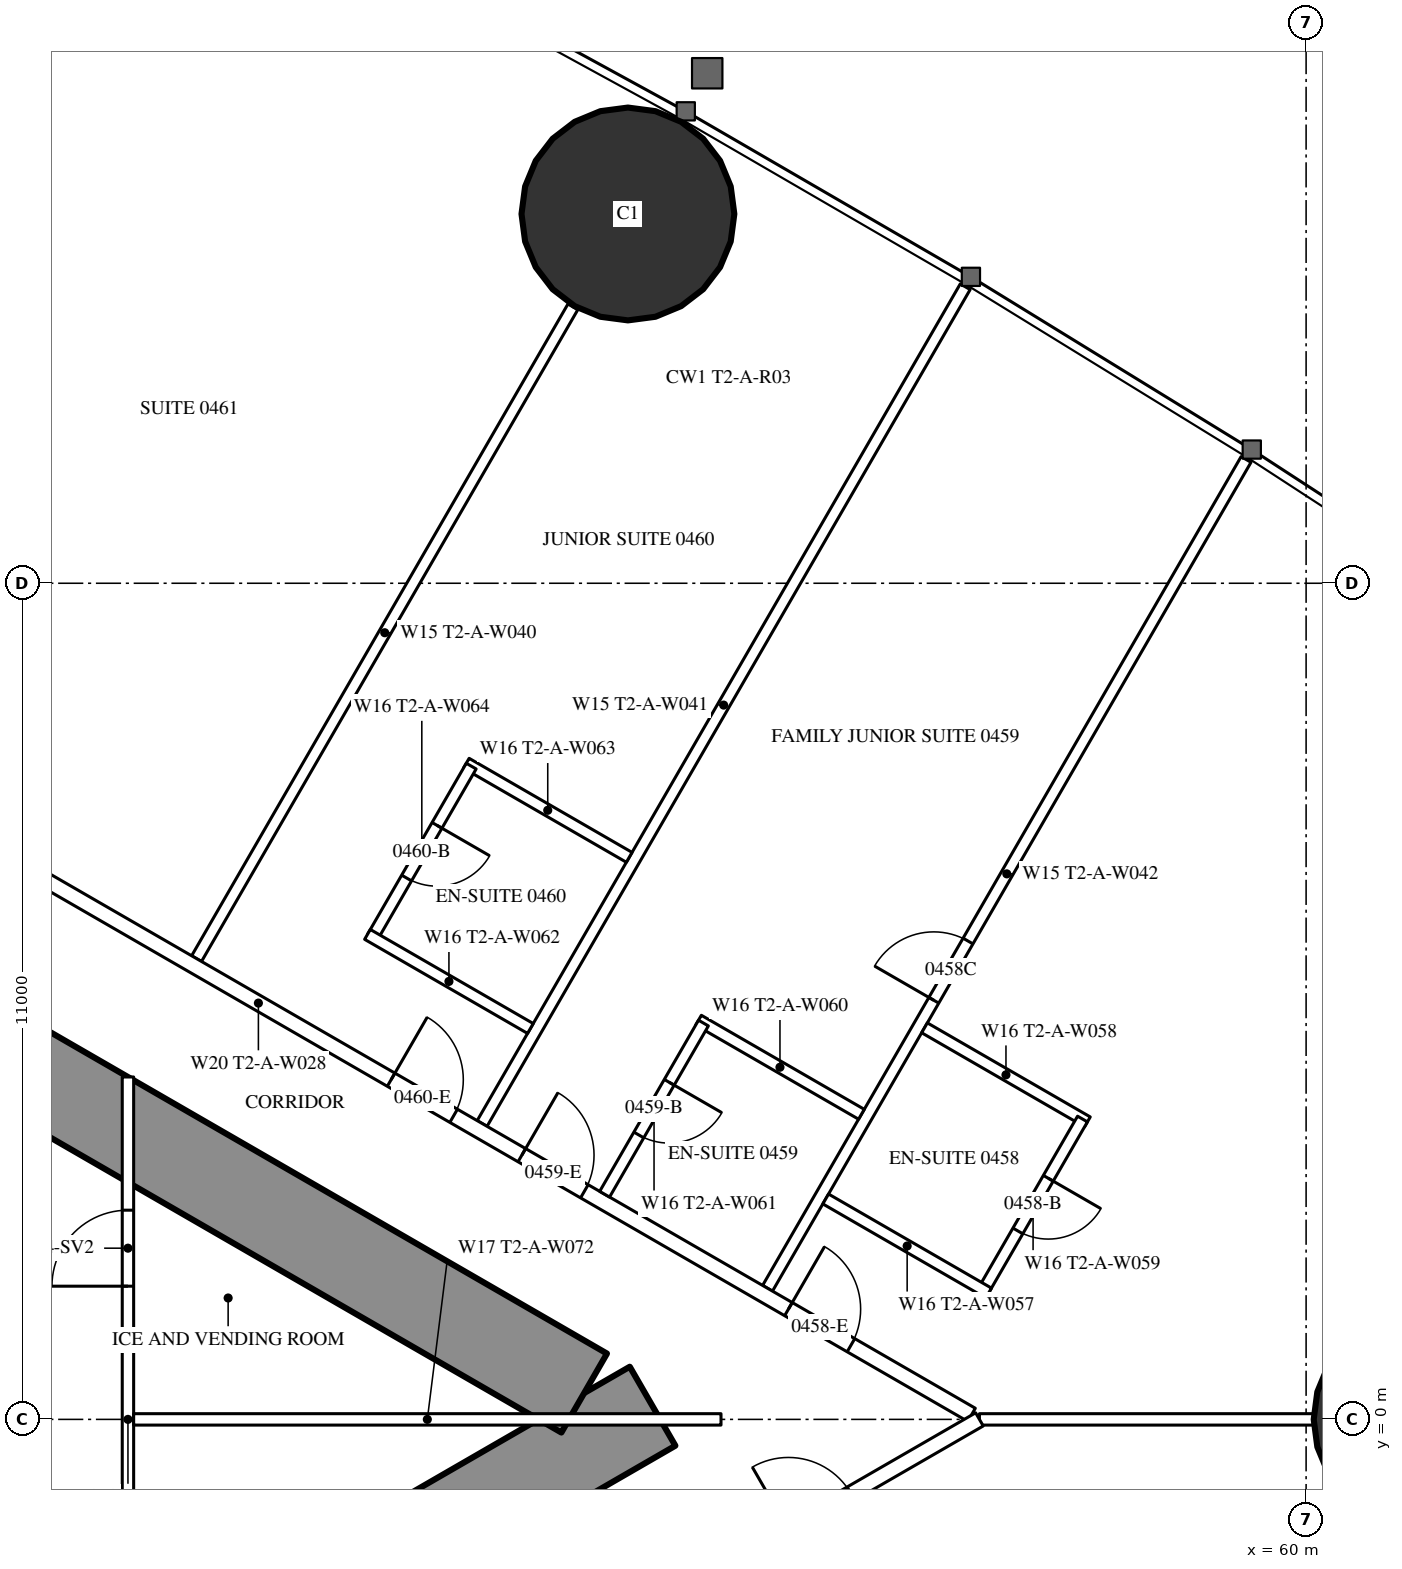
"""IFC4 building model, lengths in metres.
Left out: names, types, materials, properties, quantities, classifications, styles, units other than length and angle.
Written with IfcOpenShell. Run it as: python <this file> out.ifc"""

import sys

from ifc_helpers import new_model, si_unit, direction, frame, frame_2d, origin, origin_2d, place, context, subcontext, project, spatial, rectangle, hollow_circle, extrude, element, fill, save


model = new_model("IFC4")
c1 = context("Model", 3, precision=1e-05, world=origin(), true_north=direction((0.0, 1.0)))
c2 = subcontext(c1, "Body", "Model", "MODEL_VIEW")
j1 = project(units=[si_unit("LENGTHUNIT", "METRE"), si_unit("PLANEANGLEUNIT", "RADIAN")], contexts=[c1])
p1 = place(None, origin())
s1 = spatial("IfcSite", under=j1, at=p1, CompositionType="ELEMENT")
p2 = place(p1, origin())
s2 = spatial("IfcBuilding", under=s1, at=p2, CompositionType="ELEMENT")
p3 = place(p2, frame((0.0, 0.0, 21.5)))
s3 = spatial("IfcBuildingStorey", under=s2, at=p3, CompositionType="ELEMENT", Elevation=21.5)
p4 = place(p3, frame((51.078, 15.858, 0.0), z_axis=(0.0, 0.0, 1.0), x_axis=(1.0, 0.0, 0.0)))
e1 = element("IfcColumn", 1, at=p4, inside=s3, PredefinedType="COLUMN", context=c2, shape_type="SweptSolid", body=[
    extrude(hollow_circle(Radius=1.4, WallThickness=0.12, at=origin_2d()), origin(), (0.0, 0.0, 1.0), 3.5),
])
p5 = place(p3, frame((61.5, 0.0, 0.0), z_axis=(0.0, 0.0, 1.0), x_axis=(1.0, 0.0, 0.0)))
e2 = element("IfcColumn", 2, at=p5, inside=s3, PredefinedType="COLUMN", context=c2, shape_type="SweptSolid", body=[
    extrude(hollow_circle(Radius=1.4, WallThickness=0.1, at=origin_2d()), origin(), (0.0, 0.0, 1.0), 3.5),
])
p6 = place(p3, frame((27.2, -13.8, 0.0), z_axis=(0.0, 0.0, 1.0), x_axis=(0.866027159892, 0.499996958321, 0.0)))
e3 = element("IfcWall", 3, at=p6, inside=s3, PredefinedType="SHEAR", context=c2, shape_type="SweptSolid", body=[
    extrude(rectangle(XDim=27.947, YDim=1.2, at=frame_2d((13.973, 0.0))), origin(), (0.0, 0.0, 1.0), 3.5),
])
p7 = place(p6, frame((4.6, 0.0, 0.0)))
e4 = element("IfcOpeningElement", 4, at=p7, cuts=e3, PredefinedType="OPENING", context=c2, shape_type="SweptSolid", body=[
    extrude(rectangle(XDim=1.0, YDim=2.2, at=frame_2d((0.5, 1.1))), frame((0.0, 0.61, 0.0), z_axis=(0.0, -1.0, 0.0), x_axis=(1.0, 0.0, 0.0)), (0.0, 0.0, 1.0), 1.22),
])
p8 = place(p6, frame((13.395, 0.0, 0.0)))
e5 = element("IfcOpeningElement", 5, at=p8, cuts=e3, PredefinedType="OPENING", context=c2, shape_type="SweptSolid", body=[
    extrude(rectangle(XDim=1.8, YDim=2.2, at=frame_2d((0.9, 1.1))), frame((0.0, 0.61, 0.0), z_axis=(0.0, -1.0, 0.0), x_axis=(1.0, 0.0, 0.0)), (0.0, 0.0, 1.0), 1.22),
])
p9 = place(p3, frame((27.2, 13.8, 0.0), z_axis=(0.0, 0.0, 1.0), x_axis=(0.866024515034, -0.500001539357, 0.0)))
e6 = element("IfcWall", 6, at=p9, inside=s3, PredefinedType="SHEAR", context=c2, shape_type="SweptSolid", body=[
    extrude(rectangle(XDim=26.907, YDim=1.2, at=frame_2d((13.454, 0.0))), origin(), (0.0, 0.0, 1.0), 3.5),
])
p10 = place(p9, frame((4.6, 0.0, 0.0)))
e7 = element("IfcOpeningElement", 7, at=p10, cuts=e6, PredefinedType="OPENING", context=c2, shape_type="SweptSolid", body=[
    extrude(rectangle(XDim=1.0, YDim=2.2, at=frame_2d((0.5, 1.1))), frame((0.0, 0.61, 0.0), z_axis=(0.0, -1.0, 0.0), x_axis=(1.0, 0.0, 0.0)), (0.0, 0.0, 1.0), 1.22),
])
p11 = place(p9, frame((13.395, 0.0, 0.0)))
e8 = element("IfcOpeningElement", 8, at=p11, cuts=e6, PredefinedType="OPENING", context=c2, shape_type="SweptSolid", body=[
    extrude(rectangle(XDim=1.8, YDim=2.2, at=frame_2d((0.9, 1.1))), frame((0.0, 0.61, 0.0), z_axis=(0.0, -1.0, 0.0), x_axis=(1.0, 0.0, 0.0)), (0.0, 0.0, 1.0), 1.22),
])
p12 = place(p3, frame((45.403, 6.062, 0.0), z_axis=(0.0, 0.0, 1.0), x_axis=(0.500013434677, 0.866017647131, 0.0)))
e9 = element("IfcWall", 9, at=p12, inside=s3, PredefinedType="PARTITIONING", context=c2, shape_type="SweptSolid", body=[
    extrude(rectangle(XDim=9.902, YDim=0.15, at=frame_2d((4.951, 0.0))), origin(), (0.0, 0.0, 1.0), 2.25),
])
p13 = place(p3, frame((49.159, 3.893, 0.0), z_axis=(0.0, 0.0, 1.0), x_axis=(0.499995664361, 0.866027906952, 0.0)))
e10 = element("IfcWall", 10, at=p13, inside=s3, PredefinedType="PARTITIONING", context=c2, shape_type="SweptSolid", body=[
    extrude(rectangle(XDim=12.711, YDim=0.15, at=frame_2d((6.356, 0.0))), origin(), (0.0, 0.0, 1.0), 3.25),
])
p14 = place(p3, frame((52.915, 1.725, 0.0), z_axis=(0.0, 0.0, 1.0), x_axis=(0.499997163113, 0.866027041656, 0.0)))
e11 = element("IfcWall", 11, at=p14, inside=s3, PredefinedType="PARTITIONING", context=c2, shape_type="SweptSolid", body=[
    extrude(rectangle(XDim=12.591, YDim=0.15, at=frame_2d((6.295, 0.0))), origin(), (0.0, 0.0, 1.0), 3.25),
])
p15 = place(p14, frame((4.375, 0.0, 0.0)))
e12 = element("IfcOpeningElement", 12, at=p15, cuts=e11, PredefinedType="OPENING", context=c2, shape_type="SweptSolid", body=[
    extrude(rectangle(XDim=0.9, YDim=2.2, at=frame_2d((0.45, 1.1))), frame((0.0, 0.085, 0.0), z_axis=(0.0, -1.0, 0.0), x_axis=(1.0, 0.0, 0.0)), (0.0, 0.0, 1.0), 0.17),
])
p16 = place(p3, frame((55.702, 0.0, 0.0), z_axis=(0.0, 0.0, 1.0), x_axis=(1.0, 0.0, 0.0)))
e13 = element("IfcWall", 13, at=p16, inside=s3, PredefinedType="PARTITIONING", context=c2, shape_type="SweptSolid", body=[
    extrude(rectangle(XDim=16.117, YDim=0.15, at=frame_2d((8.059, 0.0))), origin(), (0.0, 0.0, 1.0), 2.25),
])
p17 = place(p3, frame((36.834, 10.894, 0.0), z_axis=(0.0, 0.0, 1.0), x_axis=(0.866028157229, -0.499995230863, 0.0)))
e14 = element("IfcWall", 14, at=p17, inside=s3, PredefinedType="PARTITIONING", context=c2, shape_type="SweptSolid", body=[
    extrude(rectangle(XDim=21.667, YDim=0.2, at=frame_2d((10.833, 0.0))), origin(), (0.0, 0.0, 1.0), 3.25),
])
p18 = place(p17, frame((18.885, 0.0, 0.0)))
e15 = element("IfcOpeningElement", 15, at=p18, cuts=e14, PredefinedType="OPENING", context=c2, shape_type="SweptSolid", body=[
    extrude(rectangle(XDim=0.95, YDim=2.2, at=frame_2d((0.475, 1.1))), frame((0.0, 0.11, 0.0), z_axis=(0.0, -1.0, 0.0), x_axis=(1.0, 0.0, 0.0)), (0.0, 0.0, 1.0), 0.22),
])
p19 = place(p17, frame((14.835, 0.0, 0.0)))
e16 = element("IfcOpeningElement", 16, at=p19, cuts=e14, PredefinedType="OPENING", context=c2, shape_type="SweptSolid", body=[
    extrude(rectangle(XDim=0.95, YDim=2.2, at=frame_2d((0.475, 1.1))), frame((0.0, 0.11, 0.0), z_axis=(0.0, -1.0, 0.0), x_axis=(1.0, 0.0, 0.0)), (0.0, 0.0, 1.0), 0.22),
])
p20 = place(p17, frame((12.85, 0.0, 0.0)))
e17 = element("IfcOpeningElement", 17, at=p20, cuts=e14, PredefinedType="OPENING", context=c2, shape_type="SweptSolid", body=[
    extrude(rectangle(XDim=0.95, YDim=2.2, at=frame_2d((0.475, 1.1))), frame((0.0, 0.11, 0.0), z_axis=(0.0, -1.0, 0.0), x_axis=(1.0, 0.0, 0.0)), (0.0, 0.0, 1.0), 0.22),
])
p21 = place(p17, frame((1.542, 0.0, 0.0)))
e18 = element("IfcOpeningElement", 18, at=p21, cuts=e14, PredefinedType="OPENING", context=c2, shape_type="SweptSolid", body=[
    extrude(rectangle(XDim=0.95, YDim=2.2, at=frame_2d((0.475, 1.1))), frame((0.0, 0.11, 0.0), z_axis=(0.0, -1.0, 0.0), x_axis=(1.0, 0.0, 0.0)), (0.0, 0.0, 1.0), 0.22),
])
p22 = place(p3, frame((49.131, -3.794, 0.0), z_axis=(0.0, 0.0, 1.0), x_axis=(0.866030732979, 0.499990769451, 0.0)))
e19 = element("IfcWall", 19, at=p22, inside=s3, PredefinedType="PARTITIONING", context=c2, shape_type="SweptSolid", body=[
    extrude(rectangle(XDim=7.588, YDim=0.2, at=frame_2d((3.794, 0.0))), origin(), (0.0, 0.0, 1.0), 3.25),
])
p23 = place(p22, frame((2.986, 0.0, 0.0)))
e20 = element("IfcOpeningElement", 20, at=p23, cuts=e19, PredefinedType="OPENING", context=c2, shape_type="SweptSolid", body=[
    extrude(rectangle(XDim=0.95, YDim=2.2, at=frame_2d((0.475, 1.1))), frame((0.0, 0.11, 0.0), z_axis=(0.0, -1.0, 0.0), x_axis=(1.0, 0.0, 0.0)), (0.0, 0.0, 1.0), 0.22),
])
p24 = place(p22, frame((4.686, 0.0, 0.0)))
e21 = element("IfcOpeningElement", 21, at=p24, cuts=e19, PredefinedType="OPENING", context=c2, shape_type="SweptSolid", body=[
    extrude(rectangle(XDim=0.95, YDim=2.2, at=frame_2d((0.475, 1.1))), frame((0.0, 0.11, 0.0), z_axis=(0.0, -1.0, 0.0), x_axis=(1.0, 0.0, 0.0)), (0.0, 0.0, 1.0), 0.22),
])
p25 = place(p3, frame((54.98, 5.151, 0.0), z_axis=(0.0, 0.0, 1.0), x_axis=(0.86604923931, -0.499958713387, 0.0)))
e22 = element("IfcWall", 22, at=p25, inside=s3, PredefinedType="PARTITIONING", context=c2, shape_type="SweptSolid", body=[
    extrude(rectangle(XDim=2.475, YDim=0.15, at=frame_2d((1.237, 0.0))), origin(), (0.0, 0.0, 1.0), 3.25),
])
p26 = place(p3, frame((55.758, 1.7, 0.0), z_axis=(0.0, 0.0, 1.0), x_axis=(0.500006934395, 0.866021400173, 0.0)))
e23 = element("IfcWall", 23, at=p26, inside=s3, PredefinedType="PARTITIONING", context=c2, shape_type="SweptSolid", body=[
    extrude(rectangle(XDim=2.6, YDim=0.15, at=frame_2d((1.3, 0.0))), origin(), (0.0, 0.0, 1.0), 3.25),
])
p27 = place(p26, frame((0.9, 0.0, 0.0)))
e24 = element("IfcOpeningElement", 24, at=p27, cuts=e23, PredefinedType="OPENING", context=c2, shape_type="SweptSolid", body=[
    extrude(rectangle(XDim=0.8, YDim=2.2, at=frame_2d((0.4, 1.1))), frame((0.0, 0.085, 0.0), z_axis=(0.0, -1.0, 0.0), x_axis=(1.0, 0.0, 0.0)), (0.0, 0.0, 1.0), 0.17),
])
for number, where, z_axis, x_axis in (
    (25, (53.68, 2.9, 0.0), (0.0, 0.0, 1.0), (0.866, -0.5, 0.0)),
    (26, (52.006, 5.251, 0.0), (0.0, 0.0, 1.0), (0.866, -0.5, 0.0)),
):
    element("IfcWall", number, at=place(p3, frame(where, z_axis=z_axis, x_axis=x_axis)), inside=s3, PredefinedType="PARTITIONING", context=c2, shape_type="SweptSolid", body=[
        extrude(rectangle(XDim=2.475, YDim=0.15, at=frame_2d((1.237, 0.0))), origin(), (0.0, 0.0, 1.0), 3.25),
    ])
p28 = place(p3, frame((50.771, 2.962, 0.0), z_axis=(0.0, 0.0, 1.0), x_axis=(0.500006934395, 0.866021400173, 0.0)))
e27 = element("IfcWall", 27, at=p28, inside=s3, PredefinedType="PARTITIONING", context=c2, shape_type="SweptSolid", body=[
    extrude(rectangle(XDim=2.6, YDim=0.15, at=frame_2d((1.3, 0.0))), origin(), (0.0, 0.0, 1.0), 3.25),
])
p29 = place(p28, frame((0.9, 0.0, 0.0)))
e28 = element("IfcOpeningElement", 28, at=p29, cuts=e27, PredefinedType="OPENING", context=c2, shape_type="SweptSolid", body=[
    extrude(rectangle(XDim=0.8, YDim=2.2, at=frame_2d((0.4, 1.1))), frame((0.0, 0.085, 0.0), z_axis=(0.0, -1.0, 0.0), x_axis=(1.0, 0.0, 0.0)), (0.0, 0.0, 1.0), 0.17),
])
p30 = place(p3, frame((48.951, 8.632, 0.0), z_axis=(0.0, 0.0, 1.0), x_axis=(0.866006523861, -0.500032699561, 0.0)))
e29 = element("IfcWall", 29, at=p30, inside=s3, PredefinedType="PARTITIONING", context=c2, shape_type="SweptSolid", body=[
    extrude(rectangle(XDim=2.475, YDim=0.15, at=frame_2d((1.237, 0.0))), origin(), (0.0, 0.0, 1.0), 3.25),
])
p31 = place(p3, frame((47.716, 6.343, 0.0), z_axis=(0.0, 0.0, 1.0), x_axis=(0.500006934395, 0.866021400173, 0.0)))
e30 = element("IfcWall", 30, at=p31, inside=s3, PredefinedType="PARTITIONING", context=c2, shape_type="SweptSolid", body=[
    extrude(rectangle(XDim=2.6, YDim=0.15, at=frame_2d((1.3, 0.0))), origin(), (0.0, 0.0, 1.0), 3.25),
])
p32 = place(p31, frame((0.9, 0.0, 0.0)))
e31 = element("IfcOpeningElement", 31, at=p32, cuts=e30, PredefinedType="OPENING", context=c2, shape_type="SweptSolid", body=[
    extrude(rectangle(XDim=0.8, YDim=2.2, at=frame_2d((0.4, 1.1))), frame((0.0, 0.085, 0.0), z_axis=(0.0, -1.0, 0.0), x_axis=(1.0, 0.0, 0.0)), (0.0, 0.0, 1.0), 0.17),
])
p33 = place(p3, frame((47.651, 6.38, 0.0), z_axis=(0.0, 0.0, 1.0), x_axis=(0.866031185235, -0.4999899861, 0.0)))
e32 = element("IfcWall", 32, at=p33, inside=s3, PredefinedType="PARTITIONING", context=c2, shape_type="SweptSolid", body=[
    extrude(rectangle(XDim=2.475, YDim=0.15, at=frame_2d((1.238, 0.0))), origin(), (0.0, 0.0, 1.0), 3.25),
])
p34 = place(p3, frame((44.5, -4.505, 0.0), z_axis=(0.0, 0.0, 1.0), x_axis=(0.0, 1.0, 0.0)))
e33 = element("IfcWall", 33, at=p34, inside=s3, PredefinedType="PARTITIONING", context=c2, shape_type="SweptSolid", body=[
    extrude(rectangle(XDim=9.009, YDim=0.15, at=frame_2d((4.505, 0.0))), origin(), (0.0, 0.0, 1.0), 2.45),
])
p35 = place(p34, frame((1.752, 0.0, 0.0)))
e34 = element("IfcOpeningElement", 34, at=p35, cuts=e33, PredefinedType="OPENING", context=c2, shape_type="SweptSolid", body=[
    extrude(rectangle(XDim=1.0, YDim=2.2, at=frame_2d((0.5, 1.1))), frame((0.0, 0.085, 0.0), z_axis=(0.0, -1.0, 0.0), x_axis=(1.0, 0.0, 0.0)), (0.0, 0.0, 1.0), 0.17),
])
p36 = place(p34, frame((6.257, 0.0, 0.0)))
e35 = element("IfcOpeningElement", 35, at=p36, cuts=e33, PredefinedType="OPENING", context=c2, shape_type="SweptSolid", body=[
    extrude(rectangle(XDim=1.0, YDim=2.2, at=frame_2d((0.5, 1.1))), frame((0.0, 0.085, 0.0), z_axis=(0.0, -1.0, 0.0), x_axis=(1.0, 0.0, 0.0)), (0.0, 0.0, 1.0), 0.17),
])
p37 = place(p3, frame((44.575, 0.0, 0.0), z_axis=(0.0, 0.0, 1.0), x_axis=(1.0, 0.0, 0.0)))
e36 = element("IfcWall", 36, at=p37, inside=s3, PredefinedType="PARTITIONING", context=c2, shape_type="SweptSolid", body=[
    extrude(rectangle(XDim=7.727, YDim=0.15, at=frame_2d((3.864, 0.0))), origin(), (0.0, 0.0, 1.0), 2.25),
])
p38 = place(p27, origin())
e37 = element("IfcDoor", 37, at=p38, inside=s3, OperationType="SINGLE_SWING_RIGHT", PredefinedType="DOOR", context=c2, shape_type="SweptSolid", body=[
    extrude(rectangle(XDim=0.8, YDim=2.2, at=frame_2d((0.4, 1.1))), frame((0.0, 0.025, 0.0), z_axis=(0.0, -1.0, 0.0), x_axis=(1.0, 0.0, 0.0)), (0.0, 0.0, 1.0), 0.05),
])
fill(e24, e37)
p39 = place(p18, origin())
e38 = element("IfcDoor", 38, at=p39, inside=s3, OperationType="SINGLE_SWING_LEFT", PredefinedType="DOOR", context=c2, shape_type="SweptSolid", body=[
    extrude(rectangle(XDim=0.95, YDim=2.2, at=frame_2d((0.475, 1.1))), frame((0.0, 0.025, 0.0), z_axis=(0.0, -1.0, 0.0), x_axis=(1.0, 0.0, 0.0)), (0.0, 0.0, 1.0), 0.05),
])
fill(e15, e38)
p40 = place(p29, origin())
e39 = element("IfcDoor", 39, at=p40, inside=s3, OperationType="SINGLE_SWING_RIGHT", PredefinedType="DOOR", context=c2, shape_type="SweptSolid", body=[
    extrude(rectangle(XDim=0.8, YDim=2.2, at=frame_2d((0.4, 1.1))), frame((0.0, 0.025, 0.0), z_axis=(0.0, -1.0, 0.0), x_axis=(1.0, 0.0, 0.0)), (0.0, 0.0, 1.0), 0.05),
])
fill(e28, e39)
p41 = place(p19, origin())
e40 = element("IfcDoor", 40, at=p41, inside=s3, OperationType="SINGLE_SWING_LEFT", PredefinedType="DOOR", context=c2, shape_type="SweptSolid", body=[
    extrude(rectangle(XDim=0.95, YDim=2.2, at=frame_2d((0.475, 1.1))), frame((0.0, 0.025, 0.0), z_axis=(0.0, -1.0, 0.0), x_axis=(1.0, 0.0, 0.0)), (0.0, 0.0, 1.0), 0.05),
])
fill(e16, e40)
p42 = place(p32, origin())
e41 = element("IfcDoor", 41, at=p42, inside=s3, OperationType="SINGLE_SWING_RIGHT", PredefinedType="DOOR", context=c2, shape_type="SweptSolid", body=[
    extrude(rectangle(XDim=0.8, YDim=2.2, at=frame_2d((0.4, 1.1))), frame((0.0, 0.025, 0.0), z_axis=(0.0, -1.0, 0.0), x_axis=(1.0, 0.0, 0.0)), (0.0, 0.0, 1.0), 0.05),
])
fill(e31, e41)
p43 = place(p20, origin())
e42 = element("IfcDoor", 42, at=p43, inside=s3, OperationType="SINGLE_SWING_LEFT", PredefinedType="DOOR", context=c2, shape_type="SweptSolid", body=[
    extrude(rectangle(XDim=0.95, YDim=2.2, at=frame_2d((0.475, 1.1))), frame((0.0, 0.025, 0.0), z_axis=(0.0, -1.0, 0.0), x_axis=(1.0, 0.0, 0.0)), (0.0, 0.0, 1.0), 0.05),
])
fill(e17, e42)
p44 = place(p15, origin())
e43 = element("IfcDoor", 43, at=p44, inside=s3, OperationType="SINGLE_SWING_LEFT", PredefinedType="DOOR", context=c2, shape_type="SweptSolid", body=[
    extrude(rectangle(XDim=0.9, YDim=2.2, at=frame_2d((0.45, 1.1))), frame((0.0, 0.025, 0.0), z_axis=(0.0, -1.0, 0.0), x_axis=(1.0, 0.0, 0.0)), (0.0, 0.0, 1.0), 0.05),
])
fill(e12, e43)
p45 = place(p36, origin())
e44 = element("IfcDoor", 44, at=p45, inside=s3, OperationType="SINGLE_SWING_LEFT", PredefinedType="DOOR", context=c2, shape_type="SweptSolid", body=[
    extrude(rectangle(XDim=1.0, YDim=2.2, at=frame_2d((0.5, 1.1))), frame((0.0, 0.025, 0.0), z_axis=(0.0, -1.0, 0.0), x_axis=(1.0, 0.0, 0.0)), (0.0, 0.0, 1.0), 0.05),
])
fill(e35, e44)
save(model, sys.argv[1])
